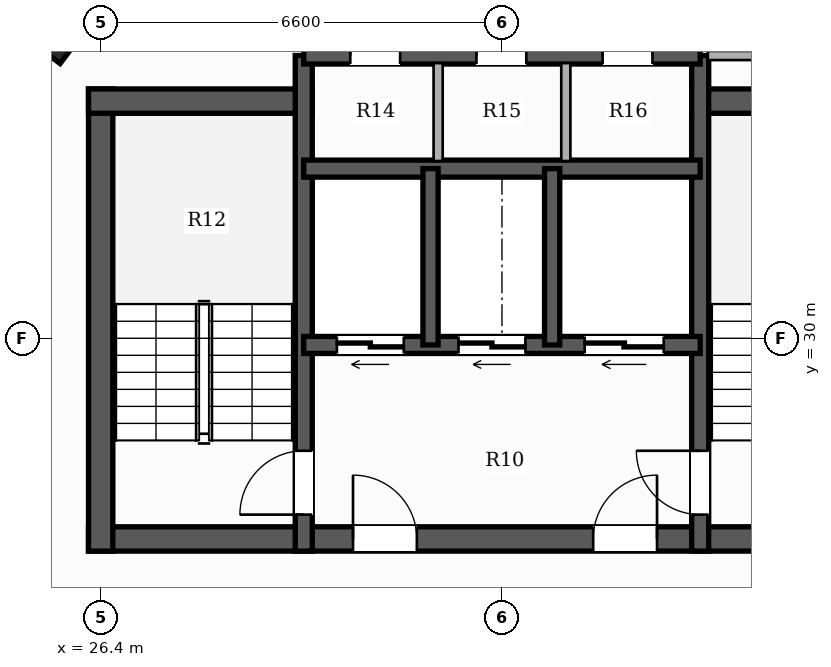
"""IFC4 building model, lengths in metres.
Left out: names, types, materials, properties, quantities, classifications, styles, units other than length and angle.
Written with IfcOpenShell. Run it as: python <this file> out.ifc"""

import sys

from ifc_helpers import new_model, si_unit, direction, frame, frame_2d, origin, origin_2d, place, context, subcontext, project, spatial, rectangle, hollow_rectangle, extrude, element, fill, save


model = new_model("IFC4")
c1 = context("Model", 3, precision=1e-05, world=origin(), true_north=direction((0.0, 1.0)))
c2 = subcontext(c1, "Body", "Model", "MODEL_VIEW")
j1 = project(units=[si_unit("LENGTHUNIT", "METRE"), si_unit("PLANEANGLEUNIT", "RADIAN")], contexts=[c1])
p1 = place(None, origin())
s1 = spatial("IfcSite", under=j1, at=p1, CompositionType="ELEMENT")
p2 = place(p1, origin())
s2 = spatial("IfcBuilding", under=s1, at=p2, CompositionType="ELEMENT")
p3 = place(p2, frame((0.0, 0.0, 153.95)))
s3 = spatial("IfcBuildingStorey", under=s2, at=p3, CompositionType="ELEMENT", Elevation=153.95)
p4 = place(p3, frame((26.2, 26.7, 0.0), z_axis=(0.0, 0.0, 1.0), x_axis=(1.0, 0.0, 0.0)))
e1 = element("IfcWall", 1, at=p4, inside=s3, PredefinedType="SHEAR", context=c2, shape_type="SweptSolid", body=[
    extrude(rectangle(XDim=13.6, YDim=0.4, at=frame_2d((6.8, 0.0))), origin(), (0.0, 0.0, 1.0), 3.3),
])
p5 = place(p4, frame((4.35, 0.0, 0.0)))
e2 = element("IfcOpeningElement", 2, at=p5, cuts=e1, PredefinedType="OPENING", context=c2, shape_type="SweptSolid", body=[
    extrude(rectangle(XDim=1.05, YDim=2.15, at=frame_2d((0.525, 1.075))), frame((0.0, 0.21, 0.0), z_axis=(0.0, -1.0, 0.0), x_axis=(1.0, 0.0, 0.0)), (0.0, 0.0, 1.0), 0.42),
])
p6 = place(p4, frame((8.3, 0.0, 0.0)))
e3 = element("IfcOpeningElement", 3, at=p6, cuts=e1, PredefinedType="OPENING", context=c2, shape_type="SweptSolid", body=[
    extrude(rectangle(XDim=1.05, YDim=2.15, at=frame_2d((0.525, 1.075))), frame((0.0, 0.21, 0.0), z_axis=(0.0, -1.0, 0.0), x_axis=(1.0, 0.0, 0.0)), (0.0, 0.0, 1.0), 0.42),
])
p7 = place(p3, frame((26.4, 26.5, 0.0), z_axis=(0.0, 0.0, 1.0), x_axis=(0.0, 1.0, 0.0)))
e4 = element("IfcWall", 4, at=p7, inside=s3, PredefinedType="SHEAR", context=c2, shape_type="SweptSolid", body=[
    extrude(rectangle(XDim=7.6, YDim=0.4, at=frame_2d((3.8, 0.0))), origin(), (0.0, 0.0, 1.0), 3.3),
])
for number, where, z_axis, x_axis in (
    (5, (26.2, 33.9, 0.0), (0.0, 0.0, 1.0), (1.0, 0.0, 0.0)),
    (6, (36.12, 33.9, 0.0), (0.0, 0.0, 1.0), (1.0, 0.0, 0.0)),
):
    element("IfcWall", number, at=place(p3, frame(where, z_axis=z_axis, x_axis=x_axis)), inside=s3, PredefinedType="SHEAR", context=c2, shape_type="SweptSolid", body=[
        extrude(rectangle(XDim=3.68, YDim=0.4, at=frame_2d((1.84, 0.0))), origin(), (0.0, 0.0, 1.0), 3.3),
    ])
p8 = place(p3, frame((29.74, 26.5, 0.0), z_axis=(0.0, 0.0, 1.0), x_axis=(0.0, 1.0, 0.0)))
e7 = element("IfcWall", 7, at=p8, inside=s3, PredefinedType="SHEAR", context=c2, shape_type="SweptSolid", body=[
    extrude(rectangle(XDim=8.15, YDim=0.28, at=frame_2d((4.075, 0.0))), origin(), (0.0, 0.0, 1.0), 3.3),
])
p9 = place(p8, frame((0.6, 0.0, 0.0)))
e8 = element("IfcOpeningElement", 8, at=p9, cuts=e7, PredefinedType="OPENING", context=c2, shape_type="SweptSolid", body=[
    extrude(rectangle(XDim=1.05, YDim=2.15, at=frame_2d((0.525, 1.075))), frame((0.0, 0.15, 0.0), z_axis=(0.0, -1.0, 0.0), x_axis=(1.0, 0.0, 0.0)), (0.0, 0.0, 1.0), 0.3),
])
p10 = place(p3, frame((36.26, 26.5, 0.0), z_axis=(0.0, 0.0, 1.0), x_axis=(0.0, 1.0, 0.0)))
e9 = element("IfcWall", 9, at=p10, inside=s3, PredefinedType="SHEAR", context=c2, shape_type="SweptSolid", body=[
    extrude(rectangle(XDim=8.15, YDim=0.28, at=frame_2d((4.075, 0.0))), origin(), (0.0, 0.0, 1.0), 3.3),
])
p11 = place(p10, frame((0.6, 0.0, 0.0)))
e10 = element("IfcOpeningElement", 10, at=p11, cuts=e9, PredefinedType="OPENING", context=c2, shape_type="SweptSolid", body=[
    extrude(rectangle(XDim=1.05, YDim=2.15, at=frame_2d((0.525, 1.075))), frame((0.0, 0.15, 0.0), z_axis=(0.0, -1.0, 0.0), x_axis=(1.0, 0.0, 0.0)), (0.0, 0.0, 1.0), 0.3),
])
p12 = place(p3, frame((36.26, 29.89, 0.0), z_axis=(0.0, 0.0, 1.0), x_axis=(-1.0, 0.0, 0.0)))
e11 = element("IfcWall", 11, at=p12, inside=s3, PredefinedType="SHEAR", context=c2, shape_type="SweptSolid", body=[
    extrude(rectangle(XDim=6.52, YDim=0.28, at=frame_2d((3.26, 0.0))), origin(), (0.0, 0.0, 1.0), 3.3),
])
p13 = place(p12, frame((4.875, 0.0, 0.0)))
e12 = element("IfcOpeningElement", 12, at=p13, cuts=e11, PredefinedType="OPENING", context=c2, shape_type="SweptSolid", body=[
    extrude(rectangle(XDim=1.1, YDim=2.2, at=frame_2d((0.55, 1.1))), frame((0.0, 0.15, 0.0), z_axis=(0.0, -1.0, 0.0), x_axis=(1.0, 0.0, 0.0)), (0.0, 0.0, 1.0), 0.3),
])
p14 = place(p12, frame((2.875, 0.0, 0.0)))
e13 = element("IfcOpeningElement", 13, at=p14, cuts=e11, PredefinedType="OPENING", context=c2, shape_type="SweptSolid", body=[
    extrude(rectangle(XDim=1.1, YDim=2.2, at=frame_2d((0.55, 1.1))), frame((0.0, 0.15, 0.0), z_axis=(0.0, -1.0, 0.0), x_axis=(1.0, 0.0, 0.0)), (0.0, 0.0, 1.0), 0.3),
])
p15 = place(p12, frame((0.6, 0.0, 0.0)))
e14 = element("IfcOpeningElement", 14, at=p15, cuts=e11, PredefinedType="OPENING", context=c2, shape_type="SweptSolid", body=[
    extrude(rectangle(XDim=1.3, YDim=2.2, at=frame_2d((0.65, 1.1))), frame((0.0, 0.15, 0.0), z_axis=(0.0, -1.0, 0.0), x_axis=(1.0, 0.0, 0.0)), (0.0, 0.0, 1.0), 0.3),
])
p16 = place(p3, frame((29.74, 32.79, 0.0), z_axis=(0.0, 0.0, 1.0), x_axis=(1.0, 0.0, 0.0)))
e15 = element("IfcWall", 15, at=p16, inside=s3, PredefinedType="SHEAR", context=c2, shape_type="SweptSolid", body=[
    extrude(rectangle(XDim=6.52, YDim=0.28, at=frame_2d((3.26, 0.0))), origin(), (0.0, 0.0, 1.0), 3.3),
])
for number, where, z_axis, x_axis in (
    (16, (31.825, 29.89, 0.0), (0.0, 0.0, 1.0), (0.0, 1.0, 0.0)),
    (17, (33.825, 29.89, 0.0), (0.0, 0.0, 1.0), (0.0, 1.0, 0.0)),
):
    element("IfcWall", number, at=place(p3, frame(where, z_axis=z_axis, x_axis=x_axis)), inside=s3, PredefinedType="SHEAR", context=c2, shape_type="SweptSolid", body=[
        extrude(rectangle(XDim=2.9, YDim=0.25, at=frame_2d((1.45, 0.0))), origin(), (0.0, 0.0, 1.0), 3.3),
    ])
p17 = place(p3, frame((29.74, 34.65, 0.0), z_axis=(0.0, 0.0, 1.0), x_axis=(1.0, 0.0, 0.0)))
e18 = element("IfcWall", 18, at=p17, inside=s3, PredefinedType="SHEAR", context=c2, shape_type="SweptSolid", body=[
    extrude(rectangle(XDim=6.52, YDim=0.28, at=frame_2d((3.26, 0.0))), origin(), (0.0, 0.0, 1.0), 3.3),
])
p18 = place(p17, frame((0.765, 0.0, 0.0)))
e19 = element("IfcOpeningElement", 19, at=p18, cuts=e18, PredefinedType="OPENING", context=c2, shape_type="SweptSolid", body=[
    extrude(rectangle(XDim=0.82, YDim=2.1, at=frame_2d((0.41, 1.05))), frame((0.0, 0.15, 0.0), z_axis=(0.0, -1.0, 0.0), x_axis=(1.0, 0.0, 0.0)), (0.0, 0.0, 1.0), 0.3),
])
p19 = place(p17, frame((2.84, 0.0, 0.0)))
e20 = element("IfcOpeningElement", 20, at=p19, cuts=e18, PredefinedType="OPENING", context=c2, shape_type="SweptSolid", body=[
    extrude(rectangle(XDim=0.82, YDim=2.1, at=frame_2d((0.41, 1.05))), frame((0.0, 0.15, 0.0), z_axis=(0.0, -1.0, 0.0), x_axis=(1.0, 0.0, 0.0)), (0.0, 0.0, 1.0), 0.3),
])
p20 = place(p17, frame((4.915, 0.0, 0.0)))
e21 = element("IfcOpeningElement", 21, at=p20, cuts=e18, PredefinedType="OPENING", context=c2, shape_type="SweptSolid", body=[
    extrude(rectangle(XDim=0.82, YDim=2.1, at=frame_2d((0.41, 1.05))), frame((0.0, 0.15, 0.0), z_axis=(0.0, -1.0, 0.0), x_axis=(1.0, 0.0, 0.0)), (0.0, 0.0, 1.0), 0.3),
])
p21 = place(p3, frame((25.648, 35.113, 0.0), z_axis=(0.0, 0.0, 1.0), x_axis=(0.600420225326, 0.799684658487, 0.0)))
e22 = element("IfcColumn", 22, at=p21, inside=s3, PredefinedType="COLUMN", context=c2, shape_type="SweptSolid", body=[
    extrude(hollow_rectangle(XDim=0.85, YDim=0.85, WallThickness=0.028, at=origin_2d()), origin(), (0.0, 0.0, 1.0), 3.3),
])
p22 = place(p3, frame((36.385, 34.65, 0.0), z_axis=(0.0, 0.0, 1.0), x_axis=(1.0, 0.0, 0.0)))
e23 = element("IfcWall", 23, at=p22, inside=s3, PredefinedType="PARTITIONING", context=c2, shape_type="SweptSolid", body=[
    extrude(rectangle(XDim=1.405, YDim=0.15, at=frame_2d((0.703, 0.0))), origin(), (0.0, 0.0, 1.0), 2.425),
])
for number, where, z_axis, x_axis in (
    (24, (31.95, 32.915, 0.0), (0.0, 0.0, 1.0), (0.0, 1.0, 0.0)),
    (25, (34.05, 32.915, 0.0), (0.0, 0.0, 1.0), (0.0, 1.0, 0.0)),
):
    element("IfcWall", number, at=place(p3, frame(where, z_axis=z_axis, x_axis=x_axis)), inside=s3, PredefinedType="PARTITIONING", context=c2, shape_type="SweptSolid", body=[
        extrude(rectangle(XDim=1.61, YDim=0.15, at=frame_2d((0.805, 0.0))), origin(), (0.0, 0.0, 1.0), 3.06),
    ])
p23 = place(p9, origin())
e26 = element("IfcDoor", 26, at=p23, inside=s3, OperationType="SINGLE_SWING_LEFT", PredefinedType="DOOR", context=c2, shape_type="SweptSolid", body=[
    extrude(rectangle(XDim=1.05, YDim=2.15, at=frame_2d((0.525, 1.075))), frame((0.0, 0.025, 0.0), z_axis=(0.0, -1.0, 0.0), x_axis=(1.0, 0.0, 0.0)), (0.0, 0.0, 1.0), 0.05),
])
fill(e8, e26)
p24 = place(p11, origin())
e27 = element("IfcDoor", 27, at=p24, inside=s3, OperationType="SINGLE_SWING_RIGHT", PredefinedType="DOOR", context=c2, shape_type="SweptSolid", body=[
    extrude(rectangle(XDim=1.05, YDim=2.15, at=frame_2d((0.525, 1.075))), frame((0.0, 0.025, 0.0), z_axis=(0.0, -1.0, 0.0), x_axis=(1.0, 0.0, 0.0)), (0.0, 0.0, 1.0), 0.05),
])
fill(e10, e27)
p25 = place(p5, origin())
e28 = element("IfcDoor", 28, at=p25, inside=s3, OperationType="SINGLE_SWING_LEFT", PredefinedType="DOOR", context=c2, shape_type="SweptSolid", body=[
    extrude(rectangle(XDim=1.05, YDim=2.15, at=frame_2d((0.525, 1.075))), frame((0.0, 0.025, 0.0), z_axis=(0.0, -1.0, 0.0), x_axis=(1.0, 0.0, 0.0)), (0.0, 0.0, 1.0), 0.05),
])
fill(e2, e28)
p26 = place(p6, origin())
e29 = element("IfcDoor", 29, at=p26, inside=s3, OperationType="SINGLE_SWING_RIGHT", PredefinedType="DOOR", context=c2, shape_type="SweptSolid", body=[
    extrude(rectangle(XDim=1.05, YDim=2.15, at=frame_2d((0.525, 1.075))), frame((0.0, 0.025, 0.0), z_axis=(0.0, -1.0, 0.0), x_axis=(1.0, 0.0, 0.0)), (0.0, 0.0, 1.0), 0.05),
])
fill(e3, e29)
p27 = place(p13, origin())
e30 = element("IfcDoor", 30, at=p27, inside=s3, OperationType="DOUBLE_DOOR_SLIDING", PredefinedType="DOOR", context=c2, shape_type="SweptSolid", body=[
    extrude(rectangle(XDim=1.1, YDim=2.2, at=frame_2d((0.55, 1.1))), frame((0.0, 0.025, 0.0), z_axis=(0.0, -1.0, 0.0), x_axis=(1.0, 0.0, 0.0)), (0.0, 0.0, 1.0), 0.05),
])
fill(e12, e30)
p28 = place(p14, origin())
e31 = element("IfcDoor", 31, at=p28, inside=s3, OperationType="DOUBLE_DOOR_SLIDING", PredefinedType="DOOR", context=c2, shape_type="SweptSolid", body=[
    extrude(rectangle(XDim=1.1, YDim=2.2, at=frame_2d((0.55, 1.1))), frame((0.0, 0.025, 0.0), z_axis=(0.0, -1.0, 0.0), x_axis=(1.0, 0.0, 0.0)), (0.0, 0.0, 1.0), 0.05),
])
fill(e13, e31)
p29 = place(p15, origin())
e32 = element("IfcDoor", 32, at=p29, inside=s3, OperationType="DOUBLE_DOOR_SLIDING", PredefinedType="DOOR", context=c2, shape_type="SweptSolid", body=[
    extrude(rectangle(XDim=1.3, YDim=2.2, at=frame_2d((0.65, 1.1))), frame((0.0, 0.025, 0.0), z_axis=(0.0, -1.0, 0.0), x_axis=(1.0, 0.0, 0.0)), (0.0, 0.0, 1.0), 0.05),
])
fill(e14, e32)
p30 = place(p18, origin())
e33 = element("IfcDoor", 33, at=p30, inside=s3, OperationType="SINGLE_SWING_LEFT", PredefinedType="DOOR", context=c2, shape_type="SweptSolid", body=[
    extrude(rectangle(XDim=0.82, YDim=2.1, at=frame_2d((0.41, 1.05))), frame((0.0, 0.025, 0.0), z_axis=(0.0, -1.0, 0.0), x_axis=(1.0, 0.0, 0.0)), (0.0, 0.0, 1.0), 0.05),
])
fill(e19, e33)
p31 = place(p19, origin())
e34 = element("IfcDoor", 34, at=p31, inside=s3, OperationType="SINGLE_SWING_LEFT", PredefinedType="DOOR", context=c2, shape_type="SweptSolid", body=[
    extrude(rectangle(XDim=0.82, YDim=2.1, at=frame_2d((0.41, 1.05))), frame((0.0, 0.025, 0.0), z_axis=(0.0, -1.0, 0.0), x_axis=(1.0, 0.0, 0.0)), (0.0, 0.0, 1.0), 0.05),
])
fill(e20, e34)
p32 = place(p20, origin())
e35 = element("IfcDoor", 35, at=p32, inside=s3, OperationType="SINGLE_SWING_LEFT", PredefinedType="DOOR", context=c2, shape_type="SweptSolid", body=[
    extrude(rectangle(XDim=0.82, YDim=2.1, at=frame_2d((0.41, 1.05))), frame((0.0, 0.025, 0.0), z_axis=(0.0, -1.0, 0.0), x_axis=(1.0, 0.0, 0.0)), (0.0, 0.0, 1.0), 0.05),
])
fill(e21, e35)
save(model, sys.argv[1])
